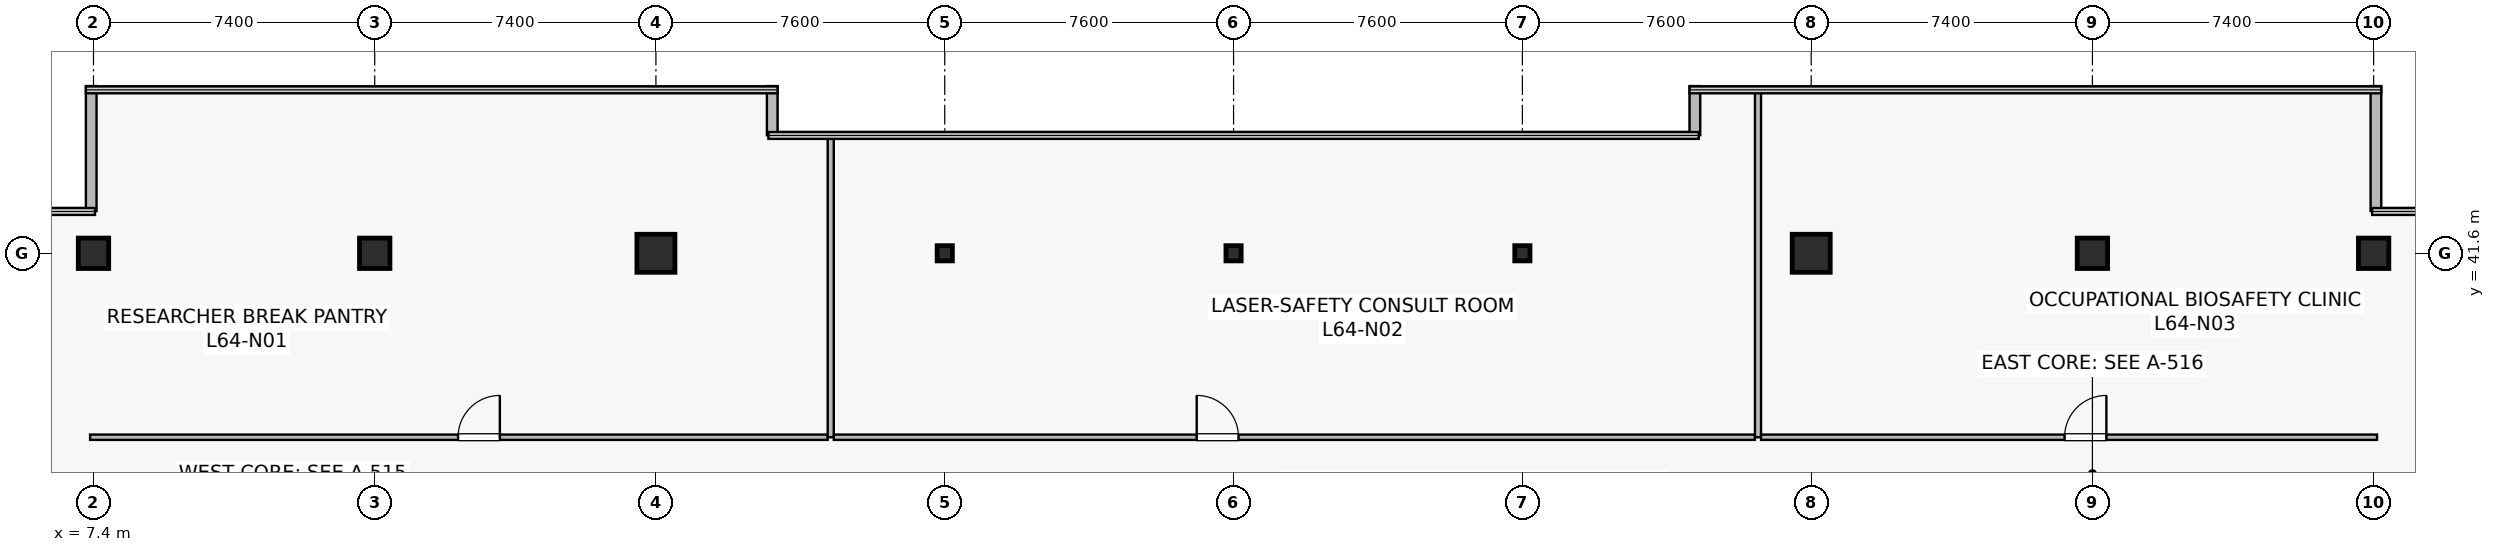
"""IFC4 building model, lengths in metres.
Left out: names, types, materials, properties, quantities, classifications, styles, units other than length and angle.
Written with IfcOpenShell. Run it as: python <this file> out.ifc"""

import sys

from ifc_helpers import new_model, si_unit, direction, frame, frame_2d, origin, origin_2d, place, context, subcontext, project, spatial, rectangle, hollow_rectangle, extrude, source, transform, mapped, element, fill, save


model = new_model("IFC4")
c1 = context("Model", 3, precision=1e-05, world=origin(), true_north=direction((0.0, 1.0)))
c2 = subcontext(c1, "Body", "Model", "MODEL_VIEW")
j1 = project(units=[si_unit("LENGTHUNIT", "METRE"), si_unit("PLANEANGLEUNIT", "RADIAN")], contexts=[c1])
p1 = place(None, origin())
s1 = spatial("IfcSite", under=j1, at=p1, CompositionType="ELEMENT")
p2 = place(p1, origin())
s2 = spatial("IfcBuilding", under=s1, at=p2, CompositionType="ELEMENT")
p3 = place(p2, frame((0.0, 0.0, 267.0)))
s3 = spatial("IfcBuildingStorey", under=s2, at=p3, CompositionType="ELEMENT", Elevation=267.0)
m1 = source(origin(), c2, "Body", "SweptSolid", [
    extrude(rectangle(XDim=0.8, YDim=0.8, at=origin_2d()), origin(), (0.0, 0.0, 1.0), 4.1),
])
p4 = place(p3, frame((14.8, 41.6, 0.0), z_axis=(0.0, 0.0, 1.0), x_axis=(1.0, 0.0, 0.0)))
e1 = element("IfcColumn", 1, at=p4, inside=s3, PredefinedType="COLUMN", context=c2, shape_type="MappedRepresentation", body=[
    mapped(m1, transform((0.0, 0.0, 0.0), scale=1.0)),
])
m2 = source(origin(), c2, "Body", "SweptSolid", [
    extrude(rectangle(XDim=1.0, YDim=1.0, at=origin_2d()), origin(), (0.0, 0.0, 1.0), 4.1),
])
for number, where, z_axis, x_axis in (
    (2, (22.2, 41.6, 0.0), (0.0, 0.0, 1.0), (1.0, 0.0, 0.0)),
    (3, (52.6, 41.6, 0.0), (0.0, 0.0, 1.0), (1.0, 0.0, 0.0)),
):
    element("IfcColumn", number, at=place(p3, frame(where, z_axis=z_axis, x_axis=x_axis)), inside=s3, PredefinedType="COLUMN", context=c2, shape_type="MappedRepresentation", body=[
        mapped(m2, transform((0.0, 0.0, 0.0), scale=1.0)),
    ])
for number, where, z_axis, x_axis in (
    (4, (60.0, 41.6, 0.0), (0.0, 0.0, 1.0), (1.0, 0.0, 0.0)),
    (5, (7.4, 41.6, 0.0), (0.0, 0.0, 1.0), (1.0, 0.0, 0.0)),
    (6, (67.4, 41.6, 0.0), (0.0, 0.0, 1.0), (1.0, 0.0, 0.0)),
):
    element("IfcColumn", number, at=place(p3, frame(where, z_axis=z_axis, x_axis=x_axis)), inside=s3, PredefinedType="COLUMN", context=c2, shape_type="MappedRepresentation", body=[
        mapped(m1, transform((0.0, 0.0, 0.0), scale=1.0)),
    ])
m3 = source(origin(), c2, "Body", "SweptSolid", [
    extrude(hollow_rectangle(XDim=0.4, YDim=0.4, WallThickness=0.019, at=origin_2d()), origin(), (0.0, 0.0, 1.0), 4.1),
])
for number, where, z_axis, x_axis in (
    (7, (29.8, 41.6, 0.0), (0.0, 0.0, 1.0), (1.0, 0.0, 0.0)),
    (8, (37.4, 41.6, 0.0), (0.0, 0.0, 1.0), (1.0, 0.0, 0.0)),
    (9, (45.0, 41.6, 0.0), (0.0, 0.0, 1.0), (1.0, 0.0, 0.0)),
):
    element("IfcColumn", number, at=place(p3, frame(where, z_axis=z_axis, x_axis=x_axis)), inside=s3, PredefinedType="COLUMN", context=c2, shape_type="MappedRepresentation", body=[
        mapped(m3, transform((0.0, 0.0, 0.0), scale=1.0)),
    ])
p5 = place(p3, frame((67.46, 42.712, 0.0), z_axis=(0.0, 0.0, 1.0), x_axis=(0.0, 1.0, 0.0)))
e10 = element("IfcWall", 10, at=p5, inside=s3, PredefinedType="STANDARD", context=c2, shape_type="SweptSolid", body=[
    extrude(rectangle(XDim=3.288, YDim=0.28, at=frame_2d((1.644, 0.0))), origin(), (0.0, 0.0, 1.0), 3.8),
])
for number, where, z_axis, x_axis in (
    (11, (49.54, 46.0, 0.0), (0.0, 0.0, 1.0), (0.0, -1.0, 0.0)),
    (12, (25.26, 44.707, 0.0), (0.0, 0.0, 1.0), (0.0, 1.0, 0.0)),
):
    element("IfcWall", number, at=place(p3, frame(where, z_axis=z_axis, x_axis=x_axis)), inside=s3, PredefinedType="STANDARD", context=c2, shape_type="SweptSolid", body=[
        extrude(rectangle(XDim=1.293, YDim=0.28, at=frame_2d((0.646, 0.0))), origin(), (0.0, 0.0, 1.0), 3.8),
    ])
p6 = place(p3, frame((7.34, 46.0, 0.0), z_axis=(0.0, 0.0, 1.0), x_axis=(0.0, -1.0, 0.0)))
e13 = element("IfcWall", 13, at=p6, inside=s3, PredefinedType="STANDARD", context=c2, shape_type="SweptSolid", body=[
    extrude(rectangle(XDim=3.288, YDim=0.28, at=frame_2d((1.644, 0.0))), origin(), (0.0, 0.0, 1.0), 3.8),
])
p7 = place(p3, frame((7.31, 36.76, 0.0), z_axis=(0.0, 0.0, 1.0), x_axis=(1.0, 0.0, 0.0)))
e14 = element("IfcWall", 14, at=p7, inside=s3, PredefinedType="PARTITIONING", context=c2, shape_type="SweptSolid", body=[
    extrude(rectangle(XDim=19.41, YDim=0.14, at=frame_2d((9.705, 0.0))), origin(), (0.0, 0.0, 1.0), 3.197),
])
p8 = place(p7, frame((9.683, 0.0, 0.0)))
e15 = element("IfcOpeningElement", 15, at=p8, cuts=e14, PredefinedType="OPENING", context=c2, shape_type="SweptSolid", body=[
    extrude(rectangle(XDim=1.1, YDim=2.18, at=frame_2d((0.55, 1.09))), frame((0.0, 0.08, 0.0), z_axis=(0.0, -1.0, 0.0), x_axis=(1.0, 0.0, 0.0)), (0.0, 0.0, 1.0), 0.16),
])
p9 = place(p3, frame((26.8, 36.76, 0.0), z_axis=(0.0, 0.0, 1.0), x_axis=(0.0, 1.0, 0.0)))
e16 = element("IfcWall", 16, at=p9, inside=s3, PredefinedType="PARTITIONING", context=c2, shape_type="SweptSolid", body=[
    extrude(rectangle(XDim=7.93, YDim=0.16, at=frame_2d((3.965, 0.0))), origin(), (0.0, 0.0, 1.0), 3.135),
])
p10 = place(p3, frame((26.88, 36.76, 0.0), z_axis=(0.0, 0.0, 1.0), x_axis=(1.0, 0.0, 0.0)))
e17 = element("IfcWall", 17, at=p10, inside=s3, PredefinedType="PARTITIONING", context=c2, shape_type="SweptSolid", body=[
    extrude(rectangle(XDim=24.24, YDim=0.14, at=frame_2d((12.12, 0.0))), origin(), (0.0, 0.0, 1.0), 3.197),
])
p11 = place(p10, frame((9.55, 0.0, 0.0)))
e18 = element("IfcOpeningElement", 18, at=p11, cuts=e17, PredefinedType="OPENING", context=c2, shape_type="SweptSolid", body=[
    extrude(rectangle(XDim=1.1, YDim=2.18, at=frame_2d((0.55, 1.09))), frame((0.0, 0.08, 0.0), z_axis=(0.0, -1.0, 0.0), x_axis=(1.0, 0.0, 0.0)), (0.0, 0.0, 1.0), 0.16),
])
p12 = place(p3, frame((51.2, 36.76, 0.0), z_axis=(0.0, 0.0, 1.0), x_axis=(0.0, 1.0, 0.0)))
e19 = element("IfcWall", 19, at=p12, inside=s3, PredefinedType="PARTITIONING", context=c2, shape_type="SweptSolid", body=[
    extrude(rectangle(XDim=9.13, YDim=0.16, at=frame_2d((4.565, 0.0))), origin(), (0.0, 0.0, 1.0), 3.135),
])
p13 = place(p3, frame((51.28, 36.76, 0.0), z_axis=(0.0, 0.0, 1.0), x_axis=(1.0, 0.0, 0.0)))
e20 = element("IfcWall", 20, at=p13, inside=s3, PredefinedType="PARTITIONING", context=c2, shape_type="SweptSolid", body=[
    extrude(rectangle(XDim=16.21, YDim=0.14, at=frame_2d((8.105, 0.0))), origin(), (0.0, 0.0, 1.0), 3.197),
])
p14 = place(p13, frame((7.987, 0.0, 0.0)))
e21 = element("IfcOpeningElement", 21, at=p14, cuts=e20, PredefinedType="OPENING", context=c2, shape_type="SweptSolid", body=[
    extrude(rectangle(XDim=1.1, YDim=2.18, at=frame_2d((0.55, 1.09))), frame((0.0, 0.08, 0.0), z_axis=(0.0, -1.0, 0.0), x_axis=(1.0, 0.0, 0.0)), (0.0, 0.0, 1.0), 0.16),
])
m4 = source(origin(), c2, "Body", "SweptSolid", [
    extrude(rectangle(XDim=1.1, YDim=2.18, at=frame_2d((0.55, 1.09))), frame((0.0, 0.025, 0.0), z_axis=(0.0, -1.0, 0.0), x_axis=(1.0, 0.0, 0.0)), (0.0, 0.0, 1.0), 0.05),
])
p15 = place(p8, origin())
e22 = element("IfcDoor", 22, at=p15, inside=s3, OperationType="SINGLE_SWING_RIGHT", PredefinedType="DOOR", context=c2, shape_type="MappedRepresentation", body=[
    mapped(m4, transform((0.0, 0.0, 0.0), scale=1.0)),
])
fill(e15, e22)
p16 = place(p11, origin())
e23 = element("IfcDoor", 23, at=p16, inside=s3, OperationType="SINGLE_SWING_LEFT", PredefinedType="DOOR", context=c2, shape_type="MappedRepresentation", body=[
    mapped(m4, transform((0.0, 0.0, 0.0), scale=1.0)),
])
fill(e18, e23)
p17 = place(p14, origin())
e24 = element("IfcDoor", 24, at=p17, inside=s3, OperationType="SINGLE_SWING_RIGHT", PredefinedType="DOOR", context=c2, shape_type="MappedRepresentation", body=[
    mapped(m4, transform((0.0, 0.0, 0.0), scale=1.0)),
])
fill(e21, e24)
save(model, sys.argv[1])
